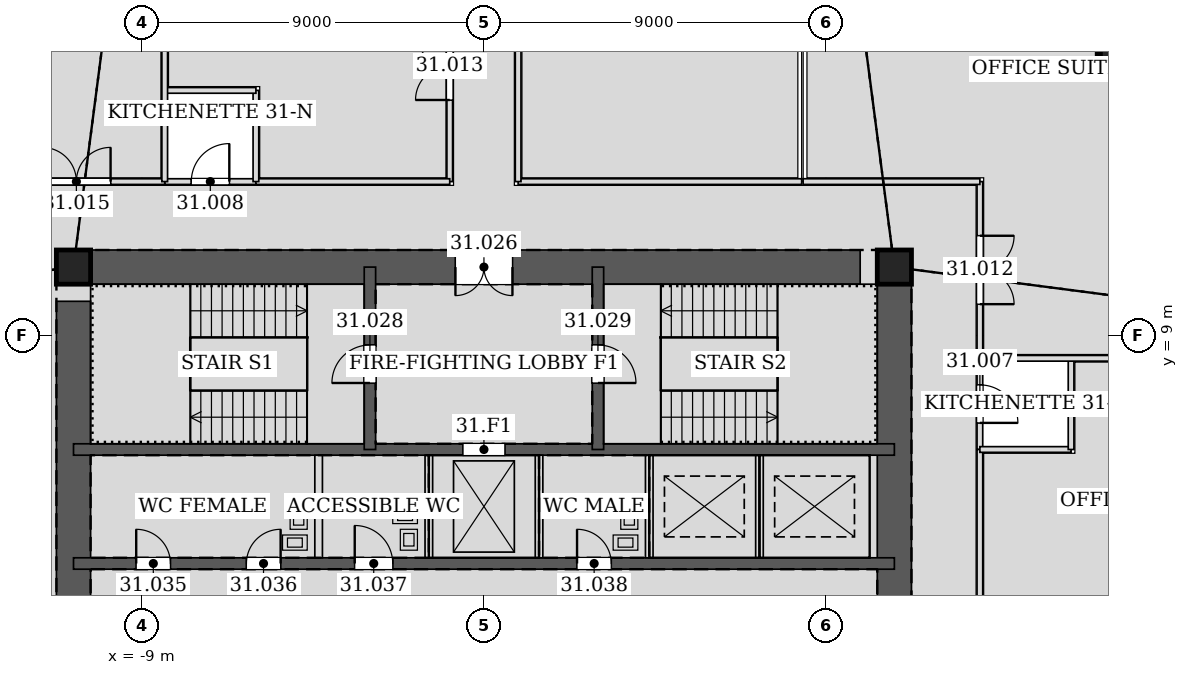
"""IFC4 building model, lengths in metres.
Left out: names, types, materials, properties, quantities, classifications, styles, units other than length and angle.
Written with IfcOpenShell. Run it as: python <this file> out.ifc"""

import sys

from ifc_helpers import new_model, si_unit, direction, frame, frame_2d, origin, origin_2d, place, context, subcontext, project, spatial, rectangle, hollow_rectangle, extrude, element, fill, save


model = new_model("IFC4")
c1 = context("Model", 3, precision=1e-05, world=origin(), true_north=direction((0.0, 1.0)))
c2 = subcontext(c1, "Body", "Model", "MODEL_VIEW")
j1 = project(units=[si_unit("LENGTHUNIT", "METRE"), si_unit("PLANEANGLEUNIT", "RADIAN")], contexts=[c1])
p1 = place(None, origin())
s1 = spatial("IfcSite", under=j1, at=p1, CompositionType="ELEMENT")
p2 = place(p1, origin())
s2 = spatial("IfcBuilding", under=s1, at=p2, CompositionType="ELEMENT")
p3 = place(p2, frame((0.0, 0.0, 138.6)))
s3 = spatial("IfcBuildingStorey", under=s2, at=p3, CompositionType="ELEMENT", Elevation=138.6)
p4 = place(p3, frame((16.471, 16.471, 0.0), z_axis=(-0.019988521213, -0.019988521213, 0.999600379171), x_axis=(0.707106781187, -0.707106781187, 0.0)))
e1 = element("IfcColumn", 1, at=p4, inside=s3, PredefinedType="COLUMN", context=c2, shape_type="SweptSolid", body=[
    extrude(hollow_rectangle(XDim=0.5, YDim=0.5, WallThickness=0.025, at=origin_2d()), origin(), (0.0, 0.0, 1.0), 4.202),
])
for number, where, z_axis, x_axis in (
    (2, (10.8, 10.8, 0.0), (0.0, 0.0, 1.0), (1.0, 0.0, 0.0)),
    (3, (-10.8, 10.8, 0.0), (0.0, 0.0, 1.0), (1.0, 0.0, 0.0)),
):
    element("IfcColumn", number, at=place(p3, frame(where, z_axis=z_axis, x_axis=x_axis)), inside=s3, PredefinedType="COLUMN", context=c2, shape_type="SweptSolid", body=[
        extrude(hollow_rectangle(XDim=0.9, YDim=0.9, WallThickness=0.06, at=origin_2d()), origin(), (0.0, 0.0, 1.0), 4.2),
    ])
p5 = place(p3, frame((10.8, -10.8, 0.0), z_axis=(0.0, 0.0, 1.0), x_axis=(0.0, 1.0, 0.0)))
e4 = element("IfcWall", 4, at=p5, inside=s3, PredefinedType="SOLIDWALL", context=c2, shape_type="SweptSolid", body=[
    extrude(rectangle(XDim=21.6, YDim=0.9, at=frame_2d((10.8, 0.0))), origin(), (0.0, 0.0, 1.0), 4.2),
])
p6 = place(p5, frame((11.7, 0.0, 0.0)))
e5 = element("IfcOpeningElement", 5, at=p6, cuts=e4, PredefinedType="OPENING", context=c2, shape_type="SweptSolid", body=[
    extrude(rectangle(XDim=1.2, YDim=2.1, at=frame_2d((0.6, 1.05))), frame((0.0, 0.46, 0.0), z_axis=(0.0, -1.0, 0.0), x_axis=(1.0, 0.0, 0.0)), (0.0, 0.0, 1.0), 0.92),
])
p7 = place(p5, frame((8.7, 0.0, 0.0)))
e6 = element("IfcOpeningElement", 6, at=p7, cuts=e4, PredefinedType="OPENING", context=c2, shape_type="SweptSolid", body=[
    extrude(rectangle(XDim=1.2, YDim=2.1, at=frame_2d((0.6, 1.05))), frame((0.0, 0.46, 0.0), z_axis=(0.0, -1.0, 0.0), x_axis=(1.0, 0.0, 0.0)), (0.0, 0.0, 1.0), 0.92),
])
p8 = place(p3, frame((10.8, 10.8, 0.0), z_axis=(0.0, 0.0, 1.0), x_axis=(-1.0, 0.0, 0.0)))
e7 = element("IfcWall", 7, at=p8, inside=s3, PredefinedType="SOLIDWALL", context=c2, shape_type="SweptSolid", body=[
    extrude(rectangle(XDim=21.6, YDim=0.9, at=frame_2d((10.8, 0.0))), origin(), (0.0, 0.0, 1.0), 4.2),
])
p9 = place(p8, frame((10.05, 0.0, 0.0)))
e8 = element("IfcOpeningElement", 8, at=p9, cuts=e7, PredefinedType="OPENING", context=c2, shape_type="SweptSolid", body=[
    extrude(rectangle(XDim=1.5, YDim=2.1, at=frame_2d((0.75, 1.05))), frame((0.0, 0.46, 0.0), z_axis=(0.0, -1.0, 0.0), x_axis=(1.0, 0.0, 0.0)), (0.0, 0.0, 1.0), 0.92),
])
p10 = place(p3, frame((-10.8, 10.8, 0.0), z_axis=(0.0, 0.0, 1.0), x_axis=(0.0, -1.0, 0.0)))
e9 = element("IfcWall", 9, at=p10, inside=s3, PredefinedType="SOLIDWALL", context=c2, shape_type="SweptSolid", body=[
    extrude(rectangle(XDim=21.6, YDim=0.9, at=frame_2d((10.8, 0.0))), origin(), (0.0, 0.0, 1.0), 4.2),
])
p11 = place(p10, frame((8.7, 0.0, 0.0)))
e10 = element("IfcOpeningElement", 10, at=p11, cuts=e9, PredefinedType="OPENING", context=c2, shape_type="SweptSolid", body=[
    extrude(rectangle(XDim=1.2, YDim=2.1, at=frame_2d((0.6, 1.05))), frame((0.0, 0.46, 0.0), z_axis=(0.0, -1.0, 0.0), x_axis=(1.0, 0.0, 0.0)), (0.0, 0.0, 1.0), 0.92),
])
p12 = place(p10, frame((11.7, 0.0, 0.0)))
e11 = element("IfcOpeningElement", 11, at=p12, cuts=e9, PredefinedType="OPENING", context=c2, shape_type="SweptSolid", body=[
    extrude(rectangle(XDim=1.2, YDim=2.1, at=frame_2d((0.6, 1.05))), frame((0.0, 0.46, 0.0), z_axis=(0.0, -1.0, 0.0), x_axis=(1.0, 0.0, 0.0)), (0.0, 0.0, 1.0), 0.92),
])
p13 = place(p3, frame((-10.8, 3.0, 0.0), z_axis=(0.0, 0.0, 1.0), x_axis=(1.0, 0.0, 0.0)))
e12 = element("IfcWall", 12, at=p13, inside=s3, PredefinedType="SOLIDWALL", context=c2, shape_type="SweptSolid", body=[
    extrude(rectangle(XDim=21.6, YDim=0.3, at=frame_2d((10.8, 0.0))), origin(), (0.0, 0.0, 1.0), 4.2),
])
p14 = place(p13, frame((1.65, 0.0, 0.0)))
e13 = element("IfcOpeningElement", 13, at=p14, cuts=e12, PredefinedType="OPENING", context=c2, shape_type="SweptSolid", body=[
    extrude(rectangle(XDim=0.9, YDim=2.1, at=frame_2d((0.45, 1.05))), frame((0.0, 0.16, 0.0), z_axis=(0.0, -1.0, 0.0), x_axis=(1.0, 0.0, 0.0)), (0.0, 0.0, 1.0), 0.32),
])
p15 = place(p13, frame((4.55, 0.0, 0.0)))
e14 = element("IfcOpeningElement", 14, at=p15, cuts=e12, PredefinedType="OPENING", context=c2, shape_type="SweptSolid", body=[
    extrude(rectangle(XDim=0.9, YDim=2.1, at=frame_2d((0.45, 1.05))), frame((0.0, 0.16, 0.0), z_axis=(0.0, -1.0, 0.0), x_axis=(1.0, 0.0, 0.0)), (0.0, 0.0, 1.0), 0.32),
])
p16 = place(p13, frame((7.4, 0.0, 0.0)))
e15 = element("IfcOpeningElement", 15, at=p16, cuts=e12, PredefinedType="OPENING", context=c2, shape_type="SweptSolid", body=[
    extrude(rectangle(XDim=1.0, YDim=2.1, at=frame_2d((0.5, 1.05))), frame((0.0, 0.16, 0.0), z_axis=(0.0, -1.0, 0.0), x_axis=(1.0, 0.0, 0.0)), (0.0, 0.0, 1.0), 0.32),
])
p17 = place(p13, frame((13.25, 0.0, 0.0)))
e16 = element("IfcOpeningElement", 16, at=p17, cuts=e12, PredefinedType="OPENING", context=c2, shape_type="SweptSolid", body=[
    extrude(rectangle(XDim=0.9, YDim=2.1, at=frame_2d((0.45, 1.05))), frame((0.0, 0.16, 0.0), z_axis=(0.0, -1.0, 0.0), x_axis=(1.0, 0.0, 0.0)), (0.0, 0.0, 1.0), 0.32),
])
p18 = place(p3, frame((-10.8, 6.0, 0.0), z_axis=(0.0, 0.0, 1.0), x_axis=(1.0, 0.0, 0.0)))
e17 = element("IfcWall", 17, at=p18, inside=s3, PredefinedType="SOLIDWALL", context=c2, shape_type="SweptSolid", body=[
    extrude(rectangle(XDim=21.6, YDim=0.3, at=frame_2d((10.8, 0.0))), origin(), (0.0, 0.0, 1.0), 4.2),
])
p19 = place(p18, frame((10.25, 0.0, 0.0)))
e18 = element("IfcOpeningElement", 18, at=p19, cuts=e17, PredefinedType="OPENING", context=c2, shape_type="SweptSolid", body=[
    extrude(rectangle(XDim=1.1, YDim=2.1, at=frame_2d((0.55, 1.05))), frame((0.0, 0.16, 0.0), z_axis=(0.0, -1.0, 0.0), x_axis=(1.0, 0.0, 0.0)), (0.0, 0.0, 1.0), 0.32),
])
p20 = place(p3, frame((-3.0, 6.0, 0.0), z_axis=(0.0, 0.0, 1.0), x_axis=(0.0, 1.0, 0.0)))
e19 = element("IfcWall", 19, at=p20, inside=s3, PredefinedType="SOLIDWALL", context=c2, shape_type="SweptSolid", body=[
    extrude(rectangle(XDim=4.8, YDim=0.3, at=frame_2d((2.4, 0.0))), origin(), (0.0, 0.0, 1.0), 4.2),
])
p21 = place(p20, frame((1.75, 0.0, 0.0)))
e20 = element("IfcOpeningElement", 20, at=p21, cuts=e19, PredefinedType="OPENING", context=c2, shape_type="SweptSolid", body=[
    extrude(rectangle(XDim=1.0, YDim=2.1, at=frame_2d((0.5, 1.05))), frame((0.0, 0.16, 0.0), z_axis=(0.0, -1.0, 0.0), x_axis=(1.0, 0.0, 0.0)), (0.0, 0.0, 1.0), 0.32),
])
p22 = place(p3, frame((3.0, 6.0, 0.0), z_axis=(0.0, 0.0, 1.0), x_axis=(0.0, 1.0, 0.0)))
e21 = element("IfcWall", 21, at=p22, inside=s3, PredefinedType="SOLIDWALL", context=c2, shape_type="SweptSolid", body=[
    extrude(rectangle(XDim=4.8, YDim=0.3, at=frame_2d((2.4, 0.0))), origin(), (0.0, 0.0, 1.0), 4.2),
])
p23 = place(p22, frame((1.75, 0.0, 0.0)))
e22 = element("IfcOpeningElement", 22, at=p23, cuts=e21, PredefinedType="OPENING", context=c2, shape_type="SweptSolid", body=[
    extrude(rectangle(XDim=1.0, YDim=2.1, at=frame_2d((0.5, 1.05))), frame((0.0, 0.16, 0.0), z_axis=(0.0, -1.0, 0.0), x_axis=(1.0, 0.0, 0.0)), (0.0, 0.0, 1.0), 0.32),
])
p24 = place(p3, frame((13.05, 5.999, 0.0), z_axis=(0.0, 0.0, 1.0), x_axis=(0.0, 1.0, 0.0)))
e23 = element("IfcWall", 23, at=p24, inside=s3, PredefinedType="PARTITIONING", context=c2, shape_type="SweptSolid", body=[
    extrude(rectangle(XDim=2.402, YDim=0.15, at=frame_2d((1.201, 0.0))), origin(), (0.0, 0.0, 1.0), 4.035),
])
p25 = place(p24, frame((0.701, 0.0, 0.0)))
e24 = element("IfcOpeningElement", 24, at=p25, cuts=e23, PredefinedType="OPENING", context=c2, shape_type="SweptSolid", body=[
    extrude(rectangle(XDim=1.0, YDim=2.1, at=frame_2d((0.5, 1.05))), frame((0.0, 0.085, 0.0), z_axis=(0.0, -1.0, 0.0), x_axis=(1.0, 0.0, 0.0)), (0.0, 0.0, 1.0), 0.17),
])
p26 = place(p3, frame((-5.999, 13.05, 0.0), z_axis=(0.0, 0.0, 1.0), x_axis=(-1.0, 0.0, 0.0)))
e25 = element("IfcWall", 25, at=p26, inside=s3, PredefinedType="PARTITIONING", context=c2, shape_type="SweptSolid", body=[
    extrude(rectangle(XDim=2.402, YDim=0.15, at=frame_2d((1.201, 0.0))), origin(), (0.0, 0.0, 1.0), 4.035),
])
p27 = place(p26, frame((0.701, 0.0, 0.0)))
e26 = element("IfcOpeningElement", 26, at=p27, cuts=e25, PredefinedType="OPENING", context=c2, shape_type="SweptSolid", body=[
    extrude(rectangle(XDim=1.0, YDim=2.1, at=frame_2d((0.5, 1.05))), frame((0.0, 0.085, 0.0), z_axis=(0.0, -1.0, 0.0), x_axis=(1.0, 0.0, 0.0)), (0.0, 0.0, 1.0), 0.17),
])
p28 = place(p3, frame((8.361, 13.05, 0.0), z_axis=(0.0, 0.0, 1.0), x_axis=(-1.0, 0.0, 0.0)))
e27 = element("IfcWall", 27, at=p28, inside=s3, PredefinedType="PARTITIONING", context=c2, shape_type="SweptSolid", body=[
    extrude(rectangle(XDim=7.461, YDim=0.15, at=frame_2d((3.73, 0.0))), origin(), (0.0, 0.0, 1.0), 4.035),
])
p29 = place(p3, frame((0.9, 13.05, 0.0), z_axis=(0.0, 0.0, 1.0), x_axis=(0.0, 1.0, 0.0)))
e28 = element("IfcWall", 28, at=p29, inside=s3, PredefinedType="PARTITIONING", context=c2, shape_type="SweptSolid", body=[
    extrude(rectangle(XDim=11.028, YDim=0.15, at=frame_2d((5.514, 0.0))), origin(), (0.0, 0.0, 1.0), 3.426),
])
p30 = place(p29, frame((4.397, 0.0, 0.0)))
e29 = element("IfcOpeningElement", 29, at=p30, cuts=e28, PredefinedType="OPENING", context=c2, shape_type="SweptSolid", body=[
    extrude(rectangle(XDim=1.8, YDim=2.4, at=frame_2d((0.9, 1.2))), frame((0.0, 0.085, 0.0), z_axis=(0.0, -1.0, 0.0), x_axis=(1.0, 0.0, 0.0)), (0.0, 0.0, 1.0), 0.17),
])
p31 = place(p3, frame((13.05, 0.9, 0.0), z_axis=(0.0, 0.0, 1.0), x_axis=(0.0, 1.0, 0.0)))
e30 = element("IfcWall", 30, at=p31, inside=s3, PredefinedType="PARTITIONING", context=c2, shape_type="SweptSolid", body=[
    extrude(rectangle(XDim=5.101, YDim=0.15, at=frame_2d((2.551, 0.0))), origin(), (0.0, 0.0, 1.0), 4.035),
])
p32 = place(p3, frame((13.05, 8.399, 0.0), z_axis=(0.0, 0.0, 1.0), x_axis=(0.0, 1.0, 0.0)))
e31 = element("IfcWall", 31, at=p32, inside=s3, PredefinedType="PARTITIONING", context=c2, shape_type="SweptSolid", body=[
    extrude(rectangle(XDim=4.651, YDim=0.15, at=frame_2d((2.326, 0.0))), origin(), (0.0, 0.0, 1.0), 3.042),
])
p33 = place(p32, frame((1.426, 0.0, 0.0)))
e32 = element("IfcOpeningElement", 32, at=p33, cuts=e31, PredefinedType="OPENING", context=c2, shape_type="SweptSolid", body=[
    extrude(rectangle(XDim=1.8, YDim=2.4, at=frame_2d((0.9, 1.2))), frame((0.0, 0.085, 0.0), z_axis=(0.0, -1.0, 0.0), x_axis=(1.0, 0.0, 0.0)), (0.0, 0.0, 1.0), 0.17),
])
p34 = place(p3, frame((13.05, 13.05, 0.0), z_axis=(0.0, 0.0, 1.0), x_axis=(-1.0, 0.0, 0.0)))
e33 = element("IfcWall", 33, at=p34, inside=s3, PredefinedType="PARTITIONING", context=c2, shape_type="SweptSolid", body=[
    extrude(rectangle(XDim=4.651, YDim=0.15, at=frame_2d((2.326, 0.0))), origin(), (0.0, 0.0, 1.0), 3.042),
])
p35 = place(p3, frame((-0.9, 19.145, 0.0), z_axis=(0.0, 0.0, 1.0), x_axis=(0.0, -1.0, 0.0)))
e34 = element("IfcWall", 34, at=p35, inside=s3, PredefinedType="PARTITIONING", context=c2, shape_type="SweptSolid", body=[
    extrude(rectangle(XDim=6.095, YDim=0.15, at=frame_2d((3.047, 0.0))), origin(), (0.0, 0.0, 1.0), 3.426),
])
p36 = place(p35, frame((2.147, 0.0, 0.0)))
e35 = element("IfcOpeningElement", 35, at=p36, cuts=e34, PredefinedType="OPENING", context=c2, shape_type="SweptSolid", body=[
    extrude(rectangle(XDim=1.8, YDim=2.4, at=frame_2d((0.9, 1.2))), frame((0.0, 0.085, 0.0), z_axis=(0.0, -1.0, 0.0), x_axis=(1.0, 0.0, 0.0)), (0.0, 0.0, 1.0), 0.17),
])
p37 = place(p3, frame((-0.9, 13.05, 0.0), z_axis=(0.0, 0.0, 1.0), x_axis=(-1.0, 0.0, 0.0)))
e36 = element("IfcWall", 36, at=p37, inside=s3, PredefinedType="PARTITIONING", context=c2, shape_type="SweptSolid", body=[
    extrude(rectangle(XDim=5.101, YDim=0.15, at=frame_2d((2.551, 0.0))), origin(), (0.0, 0.0, 1.0), 4.035),
])
p38 = place(p3, frame((-8.399, 13.05, 0.0), z_axis=(0.0, 0.0, 1.0), x_axis=(-1.0, 0.0, 0.0)))
e37 = element("IfcWall", 37, at=p38, inside=s3, PredefinedType="PARTITIONING", context=c2, shape_type="SweptSolid", body=[
    extrude(rectangle(XDim=4.651, YDim=0.15, at=frame_2d((2.326, 0.0))), origin(), (0.0, 0.0, 1.0), 3.042),
])
p39 = place(p38, frame((1.426, 0.0, 0.0)))
e38 = element("IfcOpeningElement", 38, at=p39, cuts=e37, PredefinedType="OPENING", context=c2, shape_type="SweptSolid", body=[
    extrude(rectangle(XDim=1.8, YDim=2.4, at=frame_2d((0.9, 1.2))), frame((0.0, 0.085, 0.0), z_axis=(0.0, -1.0, 0.0), x_axis=(1.0, 0.0, 0.0)), (0.0, 0.0, 1.0), 0.17),
])
p40 = place(p3, frame((13.05, 6.0, 0.0), z_axis=(0.0, 0.0, 1.0), x_axis=(1.0, 0.0, 0.0)))
e39 = element("IfcWall", 39, at=p40, inside=s3, PredefinedType="PARTITIONING", context=c2, shape_type="SweptSolid", body=[
    extrude(rectangle(XDim=2.4, YDim=0.15, at=frame_2d((1.2, 0.0))), origin(), (0.0, 0.0, 1.0), 3.426),
])
p41 = place(p3, frame((15.45, 6.0, 0.0), z_axis=(0.0, 0.0, 1.0), x_axis=(0.0, 1.0, 0.0)))
e40 = element("IfcWall", 40, at=p41, inside=s3, PredefinedType="PARTITIONING", context=c2, shape_type="SweptSolid", body=[
    extrude(rectangle(XDim=2.4, YDim=0.15, at=frame_2d((1.2, 0.0))), origin(), (0.0, 0.0, 1.0), 4.035),
])
p42 = place(p3, frame((13.05, 8.4, 0.0), z_axis=(0.0, 0.0, 1.0), x_axis=(1.0, 0.0, 0.0)))
e41 = element("IfcWall", 41, at=p42, inside=s3, PredefinedType="PARTITIONING", context=c2, shape_type="SweptSolid", body=[
    extrude(rectangle(XDim=8.76, YDim=0.15, at=frame_2d((4.38, 0.0))), origin(), (0.0, 0.0, 1.0), 3.426),
])
p43 = place(p3, frame((-6.0, 13.05, 0.0), z_axis=(0.0, 0.0, 1.0), x_axis=(0.0, 1.0, 0.0)))
e42 = element("IfcWall", 42, at=p43, inside=s3, PredefinedType="PARTITIONING", context=c2, shape_type="SweptSolid", body=[
    extrude(rectangle(XDim=2.4, YDim=0.15, at=frame_2d((1.2, 0.0))), origin(), (0.0, 0.0, 1.0), 3.426),
])
p44 = place(p3, frame((-6.0, 15.45, 0.0), z_axis=(0.0, 0.0, 1.0), x_axis=(-1.0, 0.0, 0.0)))
e43 = element("IfcWall", 43, at=p44, inside=s3, PredefinedType="PARTITIONING", context=c2, shape_type="SweptSolid", body=[
    extrude(rectangle(XDim=2.4, YDim=0.15, at=frame_2d((1.2, 0.0))), origin(), (0.0, 0.0, 1.0), 4.035),
])
p45 = place(p3, frame((-8.4, 13.05, 0.0), z_axis=(0.0, 0.0, 1.0), x_axis=(0.0, 1.0, 0.0)))
e44 = element("IfcWall", 44, at=p45, inside=s3, PredefinedType="PARTITIONING", context=c2, shape_type="SweptSolid", body=[
    extrude(rectangle(XDim=8.76, YDim=0.15, at=frame_2d((4.38, 0.0))), origin(), (0.0, 0.0, 1.0), 3.426),
])
for number, where, z_axis, x_axis in (
    (45, (-4.35, 3.15, 0.0), (0.0, 0.0, 1.0), (0.0, 1.0, 0.0)),
    (46, (-1.45, 3.15, 0.0), (0.0, 0.0, 1.0), (0.0, 1.0, 0.0)),
    (47, (1.45, 3.15, 0.0), (0.0, 0.0, 1.0), (0.0, 1.0, 0.0)),
    (48, (4.35, 3.15, 0.0), (0.0, 0.0, 1.0), (0.0, 1.0, 0.0)),
):
    element("IfcWall", number, at=place(p3, frame(where, z_axis=z_axis, x_axis=x_axis)), inside=s3, PredefinedType="PARTITIONING", context=c2, shape_type="SweptSolid", body=[
        extrude(rectangle(XDim=2.7, YDim=0.2, at=frame_2d((1.35, 0.0))), origin(), (0.0, 0.0, 1.0), 4.035),
    ])
p46 = place(p3, frame((7.25, 3.15, 0.0), z_axis=(0.0, 0.0, 1.0), x_axis=(0.0, 1.0, 0.0)))
e49 = element("IfcWall", 49, at=p46, inside=s3, PredefinedType="PARTITIONING", context=c2, shape_type="SweptSolid", body=[
    extrude(rectangle(XDim=2.7, YDim=0.2, at=frame_2d((1.35, 0.0))), origin(), (0.0, 0.0, 1.0), 4.2),
])
p47 = place(p25, frame((1.0, 0.0, 0.0), z_axis=(0.0, 0.0, 1.0), x_axis=(-1.0, 0.0, 0.0)))
e50 = element("IfcDoor", 50, at=p47, inside=s3, OperationType="SINGLE_SWING_RIGHT", PredefinedType="DOOR", context=c2, shape_type="SweptSolid", body=[
    extrude(rectangle(XDim=1.0, YDim=2.1, at=frame_2d((0.5, 1.05))), frame((0.0, 0.025, 0.0), z_axis=(0.0, -1.0, 0.0), x_axis=(1.0, 0.0, 0.0)), (0.0, 0.0, 1.0), 0.05),
])
fill(e24, e50)
p48 = place(p27, frame((1.0, 0.0, 0.0), z_axis=(0.0, 0.0, 1.0), x_axis=(-1.0, 0.0, 0.0)))
e51 = element("IfcDoor", 51, at=p48, inside=s3, OperationType="SINGLE_SWING_RIGHT", PredefinedType="DOOR", context=c2, shape_type="SweptSolid", body=[
    extrude(rectangle(XDim=1.0, YDim=2.1, at=frame_2d((0.5, 1.05))), frame((0.0, 0.025, 0.0), z_axis=(0.0, -1.0, 0.0), x_axis=(1.0, 0.0, 0.0)), (0.0, 0.0, 1.0), 0.05),
])
fill(e26, e51)
p49 = place(p33, frame((1.8, 0.0, 0.0), z_axis=(0.0, 0.0, 1.0), x_axis=(-1.0, 0.0, 0.0)))
e52 = element("IfcDoor", 52, at=p49, inside=s3, OperationType="DOUBLE_DOOR_SINGLE_SWING", PredefinedType="DOOR", context=c2, shape_type="SweptSolid", body=[
    extrude(rectangle(XDim=1.8, YDim=2.4, at=frame_2d((0.9, 1.2))), frame((0.0, 0.025, 0.0), z_axis=(0.0, -1.0, 0.0), x_axis=(1.0, 0.0, 0.0)), (0.0, 0.0, 1.0), 0.05),
])
fill(e32, e52)
p50 = place(p36, frame((1.8, 0.0, 0.0), z_axis=(0.0, 0.0, 1.0), x_axis=(-1.0, 0.0, 0.0)))
e53 = element("IfcDoor", 53, at=p50, inside=s3, OperationType="DOUBLE_DOOR_SINGLE_SWING", PredefinedType="DOOR", context=c2, shape_type="SweptSolid", body=[
    extrude(rectangle(XDim=1.8, YDim=2.4, at=frame_2d((0.9, 1.2))), frame((0.0, 0.025, 0.0), z_axis=(0.0, -1.0, 0.0), x_axis=(1.0, 0.0, 0.0)), (0.0, 0.0, 1.0), 0.05),
])
fill(e35, e53)
p51 = place(p39, frame((1.8, 0.0, 0.0), z_axis=(0.0, 0.0, 1.0), x_axis=(-1.0, 0.0, 0.0)))
e54 = element("IfcDoor", 54, at=p51, inside=s3, OperationType="DOUBLE_DOOR_SINGLE_SWING", PredefinedType="DOOR", context=c2, shape_type="SweptSolid", body=[
    extrude(rectangle(XDim=1.8, YDim=2.4, at=frame_2d((0.9, 1.2))), frame((0.0, 0.025, 0.0), z_axis=(0.0, -1.0, 0.0), x_axis=(1.0, 0.0, 0.0)), (0.0, 0.0, 1.0), 0.05),
])
fill(e38, e54)
p52 = place(p9, origin())
e55 = element("IfcDoor", 55, at=p52, inside=s3, OperationType="DOUBLE_DOOR_SINGLE_SWING", PredefinedType="DOOR", context=c2, shape_type="SweptSolid", body=[
    extrude(rectangle(XDim=1.5, YDim=2.1, at=frame_2d((0.75, 1.05))), frame((0.0, 0.025, 0.0), z_axis=(0.0, -1.0, 0.0), x_axis=(1.0, 0.0, 0.0)), (0.0, 0.0, 1.0), 0.05),
])
fill(e8, e55)
p53 = place(p21, origin())
e56 = element("IfcDoor", 56, at=p53, inside=s3, OperationType="SINGLE_SWING_LEFT", PredefinedType="DOOR", context=c2, shape_type="SweptSolid", body=[
    extrude(rectangle(XDim=1.0, YDim=2.1, at=frame_2d((0.5, 1.05))), frame((0.0, 0.025, 0.0), z_axis=(0.0, -1.0, 0.0), x_axis=(1.0, 0.0, 0.0)), (0.0, 0.0, 1.0), 0.05),
])
fill(e20, e56)
p54 = place(p23, frame((1.0, 0.0, 0.0), z_axis=(0.0, 0.0, 1.0), x_axis=(-1.0, 0.0, 0.0)))
e57 = element("IfcDoor", 57, at=p54, inside=s3, OperationType="SINGLE_SWING_RIGHT", PredefinedType="DOOR", context=c2, shape_type="SweptSolid", body=[
    extrude(rectangle(XDim=1.0, YDim=2.1, at=frame_2d((0.5, 1.05))), frame((0.0, 0.025, 0.0), z_axis=(0.0, -1.0, 0.0), x_axis=(1.0, 0.0, 0.0)), (0.0, 0.0, 1.0), 0.05),
])
fill(e22, e57)
p55 = place(p14, origin())
e58 = element("IfcDoor", 58, at=p55, inside=s3, OperationType="SINGLE_SWING_LEFT", PredefinedType="DOOR", context=c2, shape_type="SweptSolid", body=[
    extrude(rectangle(XDim=0.9, YDim=2.1, at=frame_2d((0.45, 1.05))), frame((0.0, 0.025, 0.0), z_axis=(0.0, -1.0, 0.0), x_axis=(1.0, 0.0, 0.0)), (0.0, 0.0, 1.0), 0.05),
])
fill(e13, e58)
p56 = place(p15, origin())
e59 = element("IfcDoor", 59, at=p56, inside=s3, OperationType="SINGLE_SWING_RIGHT", PredefinedType="DOOR", context=c2, shape_type="SweptSolid", body=[
    extrude(rectangle(XDim=0.9, YDim=2.1, at=frame_2d((0.45, 1.05))), frame((0.0, 0.025, 0.0), z_axis=(0.0, -1.0, 0.0), x_axis=(1.0, 0.0, 0.0)), (0.0, 0.0, 1.0), 0.05),
])
fill(e14, e59)
p57 = place(p16, origin())
e60 = element("IfcDoor", 60, at=p57, inside=s3, OperationType="SINGLE_SWING_LEFT", PredefinedType="DOOR", context=c2, shape_type="SweptSolid", body=[
    extrude(rectangle(XDim=1.0, YDim=2.1, at=frame_2d((0.5, 1.05))), frame((0.0, 0.025, 0.0), z_axis=(0.0, -1.0, 0.0), x_axis=(1.0, 0.0, 0.0)), (0.0, 0.0, 1.0), 0.05),
])
fill(e15, e60)
p58 = place(p17, origin())
e61 = element("IfcDoor", 61, at=p58, inside=s3, OperationType="SINGLE_SWING_LEFT", PredefinedType="DOOR", context=c2, shape_type="SweptSolid", body=[
    extrude(rectangle(XDim=0.9, YDim=2.1, at=frame_2d((0.45, 1.05))), frame((0.0, 0.025, 0.0), z_axis=(0.0, -1.0, 0.0), x_axis=(1.0, 0.0, 0.0)), (0.0, 0.0, 1.0), 0.05),
])
fill(e16, e61)
p59 = place(p19, origin())
e62 = element("IfcDoor", 62, at=p59, inside=s3, OperationType="DOUBLE_DOOR_SLIDING", PredefinedType="DOOR", context=c2, shape_type="SweptSolid", body=[
    extrude(rectangle(XDim=1.1, YDim=2.1, at=frame_2d((0.55, 1.05))), frame((0.0, 0.025, 0.0), z_axis=(0.0, -1.0, 0.0), x_axis=(1.0, 0.0, 0.0)), (0.0, 0.0, 1.0), 0.05),
])
fill(e18, e62)
save(model, sys.argv[1])
